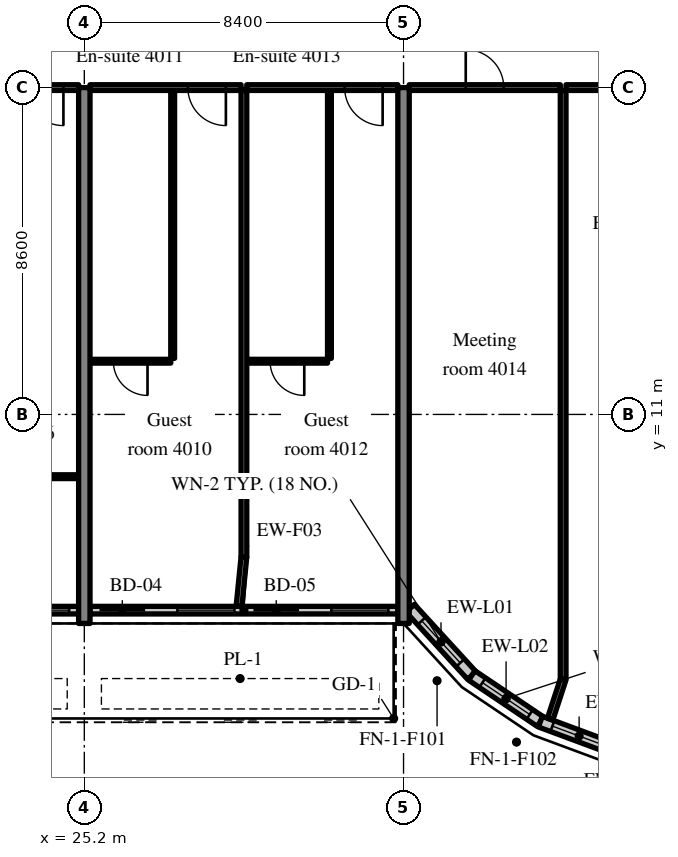
"""IFC4 building model, lengths in metres.
Left out: names, types, materials, properties, quantities, classifications, styles, units other than length and angle.
Written with IfcOpenShell. Run it as: python <this file> out.ifc"""

import sys

from ifc_helpers import new_model, si_unit, direction, frame, frame_2d, origin, place, context, subcontext, project, spatial, rectangle, extrude, source, transform, mapped, element, fill, save


model = new_model("IFC4")
c1 = context("Model", 3, precision=1e-05, world=origin(), true_north=direction((0.0, 1.0)))
c2 = subcontext(c1, "Body", "Model", "MODEL_VIEW")
j1 = project(units=[si_unit("LENGTHUNIT", "METRE"), si_unit("PLANEANGLEUNIT", "RADIAN")], contexts=[c1])
p1 = place(None, origin())
s1 = spatial("IfcSite", under=j1, at=p1, CompositionType="ELEMENT")
p2 = place(p1, origin())
s2 = spatial("IfcBuilding", under=s1, at=p2, CompositionType="ELEMENT")
p3 = place(p2, frame((0.0, 0.0, 166.8)))
s3 = spatial("IfcBuildingStorey", under=s2, at=p3, CompositionType="ELEMENT", Elevation=166.8)
m1 = source(origin(), c2, "Body", "SweptSolid", [
    extrude(rectangle(XDim=14.1, YDim=0.3, at=frame_2d((7.05, 0.0))), origin(), (0.0, 0.0, 1.0), 3.52),
])
for number, where, z_axis, x_axis in (
    (1, (25.2, 5.5, 0.0), (0.0, 0.0, 1.0), (0.0, 1.0, 0.0)),
    (2, (33.6, 5.5, 0.0), (0.0, 0.0, 1.0), (0.0, 1.0, 0.0)),
):
    element("IfcWall", number, at=place(p3, frame(where, z_axis=z_axis, x_axis=x_axis)), inside=s3, PredefinedType="SHEAR", context=c2, shape_type="MappedRepresentation", body=[
        mapped(m1, transform((0.0, 0.0, 0.0), scale=1.0)),
    ])
m2 = source(origin(), c2, "Body", "SweptSolid", [
    extrude(rectangle(XDim=8.1, YDim=0.2, at=frame_2d((4.05, 0.0))), origin(), (0.0, 0.0, 1.0), 2.87),
])
p4 = place(p3, frame((16.95, 5.85, 0.0), z_axis=(0.0, 0.0, 1.0), x_axis=(1.0, 0.0, 0.0)))
e3 = element("IfcWall", 3, at=p4, inside=s3, PredefinedType="SOLIDWALL", context=c2, shape_type="MappedRepresentation", body=[
    mapped(m2, transform((0.0, 0.0, 0.0), scale=1.0)),
])
m3 = source(origin(), c2, "Body", "SweptSolid", [
    extrude(rectangle(XDim=1.2, YDim=2.4, at=frame_2d((0.6, 1.2))), frame((0.0, 0.11, 0.0), z_axis=(0.0, -1.0, 0.0), x_axis=(1.0, 0.0, 0.0)), (0.0, 0.0, 1.0), 0.22),
])
p5 = place(p4, frame((0.25, 0.0, 0.0)))
e4 = element("IfcOpeningElement", 4, at=p5, cuts=e3, PredefinedType="OPENING", context=c2, shape_type="MappedRepresentation", body=[
    mapped(m3, transform((0.0, 0.0, 0.0), scale=1.0)),
])
m4 = source(origin(), c2, "Body", "SweptSolid", [
    extrude(rectangle(XDim=1.5, YDim=1.5, at=frame_2d((0.75, 0.75))), frame((0.0, 0.11, 0.0), z_axis=(0.0, -1.0, 0.0), x_axis=(1.0, 0.0, 0.0)), (0.0, 0.0, 1.0), 0.22),
])
p6 = place(p4, frame((2.3, 0.0, 0.9)))
e5 = element("IfcOpeningElement", 5, at=p6, cuts=e3, PredefinedType="OPENING", context=c2, shape_type="MappedRepresentation", body=[
    mapped(m4, transform((0.0, 0.0, 0.0), scale=1.0)),
])
p7 = place(p4, frame((4.3, 0.0, 0.0)))
e6 = element("IfcOpeningElement", 6, at=p7, cuts=e3, PredefinedType="OPENING", context=c2, shape_type="MappedRepresentation", body=[
    mapped(m3, transform((0.0, 0.0, 0.0), scale=1.0)),
])
p8 = place(p4, frame((6.35, 0.0, 0.9)))
e7 = element("IfcOpeningElement", 7, at=p8, cuts=e3, PredefinedType="OPENING", context=c2, shape_type="MappedRepresentation", body=[
    mapped(m4, transform((0.0, 0.0, 0.0), scale=1.0)),
])
m5 = source(origin(), c2, "Body", "SweptSolid", [
    extrude(rectangle(XDim=8.1, YDim=0.2, at=frame_2d((4.05, 0.0))), origin(), (0.0, 0.0, 1.0), 2.87),
])
p9 = place(p3, frame((25.35, 5.85, 0.0), z_axis=(0.0, 0.0, 1.0), x_axis=(1.0, 0.0, 0.0)))
e8 = element("IfcWall", 8, at=p9, inside=s3, PredefinedType="SOLIDWALL", context=c2, shape_type="MappedRepresentation", body=[
    mapped(m5, transform((0.0, 0.0, 0.0), scale=1.0)),
])
p10 = place(p9, frame((0.25, 0.0, 0.0)))
e9 = element("IfcOpeningElement", 9, at=p10, cuts=e8, PredefinedType="OPENING", context=c2, shape_type="MappedRepresentation", body=[
    mapped(m3, transform((0.0, 0.0, 0.0), scale=1.0)),
])
p11 = place(p9, frame((2.3, 0.0, 0.9)))
e10 = element("IfcOpeningElement", 10, at=p11, cuts=e8, PredefinedType="OPENING", context=c2, shape_type="MappedRepresentation", body=[
    mapped(m4, transform((0.0, 0.0, 0.0), scale=1.0)),
])
p12 = place(p9, frame((4.3, 0.0, 0.0)))
e11 = element("IfcOpeningElement", 11, at=p12, cuts=e8, PredefinedType="OPENING", context=c2, shape_type="MappedRepresentation", body=[
    mapped(m3, transform((0.0, 0.0, 0.0), scale=1.0)),
])
p13 = place(p9, frame((6.35, 0.0, 0.9)))
e12 = element("IfcOpeningElement", 12, at=p13, cuts=e8, PredefinedType="OPENING", context=c2, shape_type="MappedRepresentation", body=[
    mapped(m4, transform((0.0, 0.0, 0.0), scale=1.0)),
])
m6 = source(origin(), c2, "Body", "SweptSolid", [
    extrude(rectangle(XDim=2.398, YDim=0.3, at=frame_2d((1.199, 0.0))), origin(), (0.0, 0.0, 1.0), 3.52),
])
p14 = place(p3, frame((33.776, 5.9, 0.0), z_axis=(0.0, 0.0, 1.0), x_axis=(0.675374189419, -0.737475222815, 0.0)))
e13 = element("IfcWall", 13, at=p14, inside=s3, PredefinedType="SOLIDWALL", context=c2, shape_type="MappedRepresentation", body=[
    mapped(m6, transform((0.0, 0.0, 0.0), scale=1.0)),
])
m7 = source(origin(), c2, "Body", "SweptSolid", [
    extrude(rectangle(XDim=1.5, YDim=2.0, at=frame_2d((0.75, 1.0))), frame((0.0, 0.16, 0.0), z_axis=(0.0, -1.0, 0.0), x_axis=(1.0, 0.0, 0.0)), (0.0, 0.0, 1.0), 0.32),
])
p15 = place(p14, frame((0.449, 0.0, 0.9)))
e14 = element("IfcOpeningElement", 14, at=p15, cuts=e13, PredefinedType="OPENING", context=c2, shape_type="MappedRepresentation", body=[
    mapped(m7, transform((0.0, 0.0, 0.0), scale=1.0)),
])
m8 = source(origin(), c2, "Body", "SweptSolid", [
    extrude(rectangle(XDim=2.176, YDim=0.3, at=frame_2d((1.088, 0.0))), origin(), (0.0, 0.0, 1.0), 3.52),
])
p16 = place(p3, frame((35.396, 4.131, 0.0), z_axis=(0.0, 0.0, 1.0), x_axis=(0.829590746428, -0.558371913192, 0.0)))
e15 = element("IfcWall", 15, at=p16, inside=s3, PredefinedType="SOLIDWALL", context=c2, shape_type="MappedRepresentation", body=[
    mapped(m8, transform((0.0, 0.0, 0.0), scale=1.0)),
])
p17 = place(p16, frame((0.338, 0.0, 0.9)))
e16 = element("IfcOpeningElement", 16, at=p17, cuts=e15, PredefinedType="OPENING", context=c2, shape_type="MappedRepresentation", body=[
    mapped(m7, transform((0.0, 0.0, 0.0), scale=1.0)),
])
p18 = place(p3, frame((37.201, 2.917, 0.0), z_axis=(0.0, 0.0, 1.0), x_axis=(0.93754555999, -0.347862505801, 0.0)))
e17 = element("IfcWall", 17, at=p18, inside=s3, PredefinedType="SOLIDWALL", context=c2, shape_type="MappedRepresentation", body=[
    mapped(m8, transform((0.0, 0.0, 0.0), scale=1.0)),
])
p19 = place(p18, frame((0.338, 0.0, 0.9)))
e18 = element("IfcOpeningElement", 18, at=p19, cuts=e17, PredefinedType="OPENING", context=c2, shape_type="MappedRepresentation", body=[
    mapped(m7, transform((0.0, 0.0, 0.0), scale=1.0)),
])
m9 = source(origin(), c2, "Body", "SweptSolid", [
    extrude(rectangle(XDim=8.1, YDim=0.1, at=frame_2d((4.05, 0.0))), origin(), (0.0, 0.0, 1.0), 3.52),
])
p20 = place(p3, frame((16.95, 9.362, 0.0), z_axis=(0.0, 0.0, 1.0), x_axis=(1.0, 0.0, 0.0)))
e19 = element("IfcWall", 19, at=p20, inside=s3, PredefinedType="PARTITIONING", context=c2, shape_type="MappedRepresentation", body=[
    mapped(m9, transform((0.0, 0.0, 0.0), scale=1.0)),
])
m10 = source(origin(), c2, "Body", "SweptSolid", [
    extrude(rectangle(XDim=1.8, YDim=2.1, at=frame_2d((0.9, 1.05))), frame((0.0, 0.06, 0.0), z_axis=(0.0, -1.0, 0.0), x_axis=(1.0, 0.0, 0.0)), (0.0, 0.0, 1.0), 0.12),
])
p21 = place(p20, frame((3.15, 0.0, 0.0)))
e20 = element("IfcOpeningElement", 20, at=p21, cuts=e19, PredefinedType="OPENING", context=c2, shape_type="MappedRepresentation", body=[
    mapped(m10, transform((0.0, 0.0, 0.0), scale=1.0)),
])
m11 = source(origin(), c2, "Body", "SweptSolid", [
    extrude(rectangle(XDim=8.1, YDim=0.15, at=frame_2d((4.05, 0.0))), origin(), (0.0, 0.0, 1.0), 2.82),
])
p22 = place(p3, frame((16.95, 19.6, 0.0), z_axis=(0.0, 0.0, 1.0), x_axis=(1.0, 0.0, 0.0)))
e21 = element("IfcWall", 21, at=p22, inside=s3, PredefinedType="PARTITIONING", context=c2, shape_type="MappedRepresentation", body=[
    mapped(m11, transform((0.0, 0.0, 0.0), scale=1.0)),
])
m12 = source(origin(), c2, "Body", "SweptSolid", [
    extrude(rectangle(XDim=1.0, YDim=2.1, at=frame_2d((0.5, 1.05))), frame((0.0, 0.085, 0.0), z_axis=(0.0, -1.0, 0.0), x_axis=(1.0, 0.0, 0.0)), (0.0, 0.0, 1.0), 0.17),
])
p23 = place(p22, frame((6.7, 0.0, 0.0)))
e22 = element("IfcOpeningElement", 22, at=p23, cuts=e21, PredefinedType="OPENING", context=c2, shape_type="MappedRepresentation", body=[
    mapped(m12, transform((0.0, 0.0, 0.0), scale=1.0)),
])
m13 = source(origin(), c2, "Body", "SweptSolid", [
    extrude(rectangle(XDim=7.05, YDim=0.1, at=frame_2d((3.525, 0.0))), origin(), (0.0, 0.0, 1.0), 3.52),
])
p24 = place(p3, frame((27.525, 12.475, 0.0), z_axis=(0.0, 0.0, 1.0), x_axis=(0.0, 1.0, 0.0)))
e23 = element("IfcWall", 23, at=p24, inside=s3, PredefinedType="PARTITIONING", context=c2, shape_type="MappedRepresentation", body=[
    mapped(m13, transform((0.0, 0.0, 0.0), scale=1.0)),
])
m14 = source(origin(), c2, "Body", "SweptSolid", [
    extrude(rectangle(XDim=2.125, YDim=0.1, at=frame_2d((1.062, 0.0))), origin(), (0.0, 0.0, 1.0), 3.52),
])
p25 = place(p3, frame((25.35, 12.4, 0.0), z_axis=(0.0, 0.0, 1.0), x_axis=(1.0, 0.0, 0.0)))
e24 = element("IfcWall", 24, at=p25, inside=s3, PredefinedType="PARTITIONING", context=c2, shape_type="MappedRepresentation", body=[
    mapped(m14, transform((0.0, 0.0, 0.0), scale=1.0)),
])
m15 = source(origin(), c2, "Body", "SweptSolid", [
    extrude(rectangle(XDim=0.9, YDim=2.1, at=frame_2d((0.45, 1.05))), frame((0.0, 0.06, 0.0), z_axis=(0.0, -1.0, 0.0), x_axis=(1.0, 0.0, 0.0)), (0.0, 0.0, 1.0), 0.12),
])
p26 = place(p25, frame((0.613, 0.0, 0.0)))
e25 = element("IfcOpeningElement", 25, at=p26, cuts=e24, PredefinedType="OPENING", context=c2, shape_type="MappedRepresentation", body=[
    mapped(m15, transform((0.0, 0.0, 0.0), scale=1.0)),
])
m16 = source(origin(), c2, "Body", "SweptSolid", [
    extrude(rectangle(XDim=3.975, YDim=0.15, at=frame_2d((1.987, 0.0))), origin(), (0.0, 0.0, 1.0), 2.82),
])
p27 = place(p3, frame((25.35, 19.6, 0.0), z_axis=(0.0, 0.0, 1.0), x_axis=(1.0, 0.0, 0.0)))
e26 = element("IfcWall", 26, at=p27, inside=s3, PredefinedType="PARTITIONING", context=c2, shape_type="MappedRepresentation", body=[
    mapped(m16, transform((0.0, 0.0, 0.0), scale=1.0)),
])
p28 = place(p27, frame((2.575, 0.0, 0.0)))
e27 = element("IfcOpeningElement", 27, at=p28, cuts=e26, PredefinedType="OPENING", context=c2, shape_type="MappedRepresentation", body=[
    mapped(m12, transform((0.0, 0.0, 0.0), scale=1.0)),
])
p29 = place(p3, frame((31.65, 12.475, 0.0), z_axis=(0.0, 0.0, 1.0), x_axis=(0.0, 1.0, 0.0)))
e28 = element("IfcWall", 28, at=p29, inside=s3, PredefinedType="PARTITIONING", context=c2, shape_type="MappedRepresentation", body=[
    mapped(m13, transform((0.0, 0.0, 0.0), scale=1.0)),
])
p30 = place(p3, frame((29.475, 12.4, 0.0), z_axis=(0.0, 0.0, 1.0), x_axis=(1.0, 0.0, 0.0)))
e29 = element("IfcWall", 29, at=p30, inside=s3, PredefinedType="PARTITIONING", context=c2, shape_type="MappedRepresentation", body=[
    mapped(m14, transform((0.0, 0.0, 0.0), scale=1.0)),
])
p31 = place(p30, frame((0.613, 0.0, 0.0)))
e30 = element("IfcOpeningElement", 30, at=p31, cuts=e29, PredefinedType="OPENING", context=c2, shape_type="MappedRepresentation", body=[
    mapped(m15, transform((0.0, 0.0, 0.0), scale=1.0)),
])
p32 = place(p3, frame((29.475, 19.6, 0.0), z_axis=(0.0, 0.0, 1.0), x_axis=(1.0, 0.0, 0.0)))
e31 = element("IfcWall", 31, at=p32, inside=s3, PredefinedType="PARTITIONING", context=c2, shape_type="MappedRepresentation", body=[
    mapped(m16, transform((0.0, 0.0, 0.0), scale=1.0)),
])
p33 = place(p32, frame((2.575, 0.0, 0.0)))
e32 = element("IfcOpeningElement", 32, at=p33, cuts=e31, PredefinedType="OPENING", context=c2, shape_type="MappedRepresentation", body=[
    mapped(m12, transform((0.0, 0.0, 0.0), scale=1.0)),
])
m17 = source(origin(), c2, "Body", "SweptSolid", [
    extrude(rectangle(XDim=12.275, YDim=0.15, at=frame_2d((6.137, 0.0))), origin(), (0.0, 0.0, 1.0), 3.52),
])
p34 = place(p3, frame((29.4, 7.25, 0.0), z_axis=(0.0, 0.0, 1.0), x_axis=(0.0, 1.0, 0.0)))
e33 = element("IfcWall", 33, at=p34, inside=s3, PredefinedType="PARTITIONING", context=c2, shape_type="MappedRepresentation", body=[
    mapped(m17, transform((0.0, 0.0, 0.0), scale=1.0)),
])
m18 = source(origin(), c2, "Body", "SweptSolid", [
    extrude(rectangle(XDim=3.975, YDim=0.15, at=frame_2d((1.988, 0.0))), origin(), (0.0, 0.0, 1.0), 2.82),
])
p35 = place(p3, frame((33.75, 19.6, 0.0), z_axis=(0.0, 0.0, 1.0), x_axis=(1.0, 0.0, 0.0)))
e34 = element("IfcWall", 34, at=p35, inside=s3, PredefinedType="PARTITIONING", context=c2, shape_type="MappedRepresentation", body=[
    mapped(m18, transform((0.0, 0.0, 0.0), scale=1.0)),
])
p36 = place(p35, frame((1.487, 0.0, 0.0)))
e35 = element("IfcOpeningElement", 35, at=p36, cuts=e34, PredefinedType="OPENING", context=c2, shape_type="MappedRepresentation", body=[
    mapped(m12, transform((0.0, 0.0, 0.0), scale=1.0)),
])
p37 = place(p3, frame((37.875, 19.6, 0.0), z_axis=(0.0, 0.0, 1.0), x_axis=(1.0, 0.0, 0.0)))
e36 = element("IfcWall", 36, at=p37, inside=s3, PredefinedType="PARTITIONING", context=c2, shape_type="MappedRepresentation", body=[
    mapped(m18, transform((0.0, 0.0, 0.0), scale=1.0)),
])
p38 = place(p37, frame((1.487, 0.0, 0.0)))
e37 = element("IfcOpeningElement", 37, at=p38, cuts=e36, PredefinedType="OPENING", context=c2, shape_type="MappedRepresentation", body=[
    mapped(m12, transform((0.0, 0.0, 0.0), scale=1.0)),
])
m19 = source(origin(), c2, "Body", "SweptSolid", [
    extrude(rectangle(XDim=15.498, YDim=0.15, at=frame_2d((7.749, 0.0))), origin(), (0.0, 0.0, 1.0), 3.52),
])
p39 = place(p3, frame((37.8, 4.027, 0.0), z_axis=(0.0, 0.0, 1.0), x_axis=(0.0, 1.0, 0.0)))
e38 = element("IfcWall", 38, at=p39, inside=s3, PredefinedType="PARTITIONING", context=c2, shape_type="MappedRepresentation", body=[
    mapped(m19, transform((0.0, 0.0, 0.0), scale=1.0)),
])
m20 = source(origin(), c2, "Body", "SweptSolid", [
    extrude(rectangle(XDim=1.307, YDim=0.15, at=frame_2d((0.653, 0.0))), origin(), (0.0, 0.0, 1.0), 3.52),
])
p40 = place(p3, frame((29.27, 5.95, 0.0), z_axis=(0.0, 0.0, 1.0), x_axis=(0.099411212066, 0.995046436562, 0.0)))
e39 = element("IfcWall", 39, at=p40, inside=s3, PredefinedType="PARTITIONING", context=c2, shape_type="MappedRepresentation", body=[
    mapped(m20, transform((0.0, 0.0, 0.0), scale=1.0)),
])
m21 = source(origin(), c2, "Body", "SweptSolid", [
    extrude(rectangle(XDim=1.101, YDim=0.15, at=frame_2d((0.55, 0.0))), origin(), (0.0, 0.0, 1.0), 3.52),
])
p41 = place(p3, frame((37.457, 2.981, 0.0), z_axis=(0.0, 0.0, 1.0), x_axis=(0.311567081539, 0.950224159712, 0.0)))
e40 = element("IfcWall", 40, at=p41, inside=s3, PredefinedType="PARTITIONING", context=c2, shape_type="MappedRepresentation", body=[
    mapped(m21, transform((0.0, 0.0, 0.0), scale=1.0)),
])
m22 = source(origin(), c2, "Body", "SweptSolid", [
    extrude(rectangle(XDim=1.5, YDim=1.5, at=frame_2d((0.75, 0.75))), frame((0.0, 0.03, 0.0), z_axis=(0.0, -1.0, 0.0), x_axis=(1.0, 0.0, 0.0)), (0.0, 0.0, 1.0), 0.06),
])
p42 = place(p8, origin())
e41 = element("IfcWindow", 41, at=p42, inside=s3, PartitioningType="SINGLE_PANEL", PredefinedType="WINDOW", context=c2, shape_type="MappedRepresentation", body=[
    mapped(m22, transform((0.0, 0.0, 0.0), scale=1.0)),
])
fill(e7, e41)
m23 = source(origin(), c2, "Body", "SweptSolid", [
    extrude(rectangle(XDim=1.2, YDim=2.4, at=frame_2d((0.6, 1.2))), frame((0.0, 0.025, 0.0), z_axis=(0.0, -1.0, 0.0), x_axis=(1.0, 0.0, 0.0)), (0.0, 0.0, 1.0), 0.05),
])
p43 = place(p10, origin())
e42 = element("IfcDoor", 42, at=p43, inside=s3, OperationType="SLIDING_TO_RIGHT", PredefinedType="DOOR", context=c2, shape_type="MappedRepresentation", body=[
    mapped(m23, transform((0.0, 0.0, 0.0), scale=1.0)),
])
fill(e9, e42)
p44 = place(p11, origin())
e43 = element("IfcWindow", 43, at=p44, inside=s3, PartitioningType="SINGLE_PANEL", PredefinedType="WINDOW", context=c2, shape_type="MappedRepresentation", body=[
    mapped(m22, transform((0.0, 0.0, 0.0), scale=1.0)),
])
fill(e10, e43)
p45 = place(p12, origin())
e44 = element("IfcDoor", 44, at=p45, inside=s3, OperationType="SLIDING_TO_LEFT", PredefinedType="DOOR", context=c2, shape_type="MappedRepresentation", body=[
    mapped(m23, transform((0.0, 0.0, 0.0), scale=1.0)),
])
fill(e11, e44)
p46 = place(p13, origin())
e45 = element("IfcWindow", 45, at=p46, inside=s3, PartitioningType="SINGLE_PANEL", PredefinedType="WINDOW", context=c2, shape_type="MappedRepresentation", body=[
    mapped(m22, transform((0.0, 0.0, 0.0), scale=1.0)),
])
fill(e12, e45)
m24 = source(origin(), c2, "Body", "SweptSolid", [
    extrude(rectangle(XDim=1.5, YDim=2.0, at=frame_2d((0.75, 1.0))), frame((0.0, 0.03, 0.0), z_axis=(0.0, -1.0, 0.0), x_axis=(1.0, 0.0, 0.0)), (0.0, 0.0, 1.0), 0.06),
])
p47 = place(p15, origin())
e46 = element("IfcWindow", 46, at=p47, inside=s3, PartitioningType="SINGLE_PANEL", PredefinedType="WINDOW", context=c2, shape_type="MappedRepresentation", body=[
    mapped(m24, transform((0.0, 0.0, 0.0), scale=1.0)),
])
fill(e14, e46)
p48 = place(p17, origin())
e47 = element("IfcWindow", 47, at=p48, inside=s3, PartitioningType="SINGLE_PANEL", PredefinedType="WINDOW", context=c2, shape_type="MappedRepresentation", body=[
    mapped(m24, transform((0.0, 0.0, 0.0), scale=1.0)),
])
fill(e16, e47)
p49 = place(p19, origin())
e48 = element("IfcWindow", 48, at=p49, inside=s3, PartitioningType="SINGLE_PANEL", PredefinedType="WINDOW", context=c2, shape_type="MappedRepresentation", body=[
    mapped(m24, transform((0.0, 0.0, 0.0), scale=1.0)),
])
fill(e18, e48)
m25 = source(origin(), c2, "Body", "SweptSolid", [
    extrude(rectangle(XDim=1.0, YDim=2.1, at=frame_2d((0.5, 1.05))), frame((0.0, 0.025, 0.0), z_axis=(0.0, -1.0, 0.0), x_axis=(1.0, 0.0, 0.0)), (0.0, 0.0, 1.0), 0.05),
])
p50 = place(p23, origin())
e49 = element("IfcDoor", 49, at=p50, inside=s3, OperationType="SINGLE_SWING_RIGHT", PredefinedType="DOOR", context=c2, shape_type="MappedRepresentation", body=[
    mapped(m25, transform((0.0, 0.0, 0.0), scale=1.0)),
])
fill(e22, e49)
m26 = source(origin(), c2, "Body", "SweptSolid", [
    extrude(rectangle(XDim=0.9, YDim=2.1, at=frame_2d((0.45, 1.05))), frame((0.0, 0.025, 0.0), z_axis=(0.0, -1.0, 0.0), x_axis=(1.0, 0.0, 0.0)), (0.0, 0.0, 1.0), 0.05),
])
p51 = place(p26, origin())
e50 = element("IfcDoor", 50, at=p51, inside=s3, OperationType="SINGLE_SWING_RIGHT", PredefinedType="DOOR", context=c2, shape_type="MappedRepresentation", body=[
    mapped(m26, transform((0.0, 0.0, 0.0), scale=1.0)),
])
fill(e25, e50)
p52 = place(p28, origin())
e51 = element("IfcDoor", 51, at=p52, inside=s3, OperationType="SINGLE_SWING_RIGHT", PredefinedType="DOOR", context=c2, shape_type="MappedRepresentation", body=[
    mapped(m25, transform((0.0, 0.0, 0.0), scale=1.0)),
])
fill(e27, e51)
p53 = place(p31, origin())
e52 = element("IfcDoor", 52, at=p53, inside=s3, OperationType="SINGLE_SWING_RIGHT", PredefinedType="DOOR", context=c2, shape_type="MappedRepresentation", body=[
    mapped(m26, transform((0.0, 0.0, 0.0), scale=1.0)),
])
fill(e30, e52)
p54 = place(p33, origin())
e53 = element("IfcDoor", 53, at=p54, inside=s3, OperationType="SINGLE_SWING_RIGHT", PredefinedType="DOOR", context=c2, shape_type="MappedRepresentation", body=[
    mapped(m25, transform((0.0, 0.0, 0.0), scale=1.0)),
])
fill(e32, e53)
p55 = place(p36, origin())
e54 = element("IfcDoor", 54, at=p55, inside=s3, OperationType="SINGLE_SWING_LEFT", PredefinedType="DOOR", context=c2, shape_type="MappedRepresentation", body=[
    mapped(m25, transform((0.0, 0.0, 0.0), scale=1.0)),
])
fill(e35, e54)
save(model, sys.argv[1])
